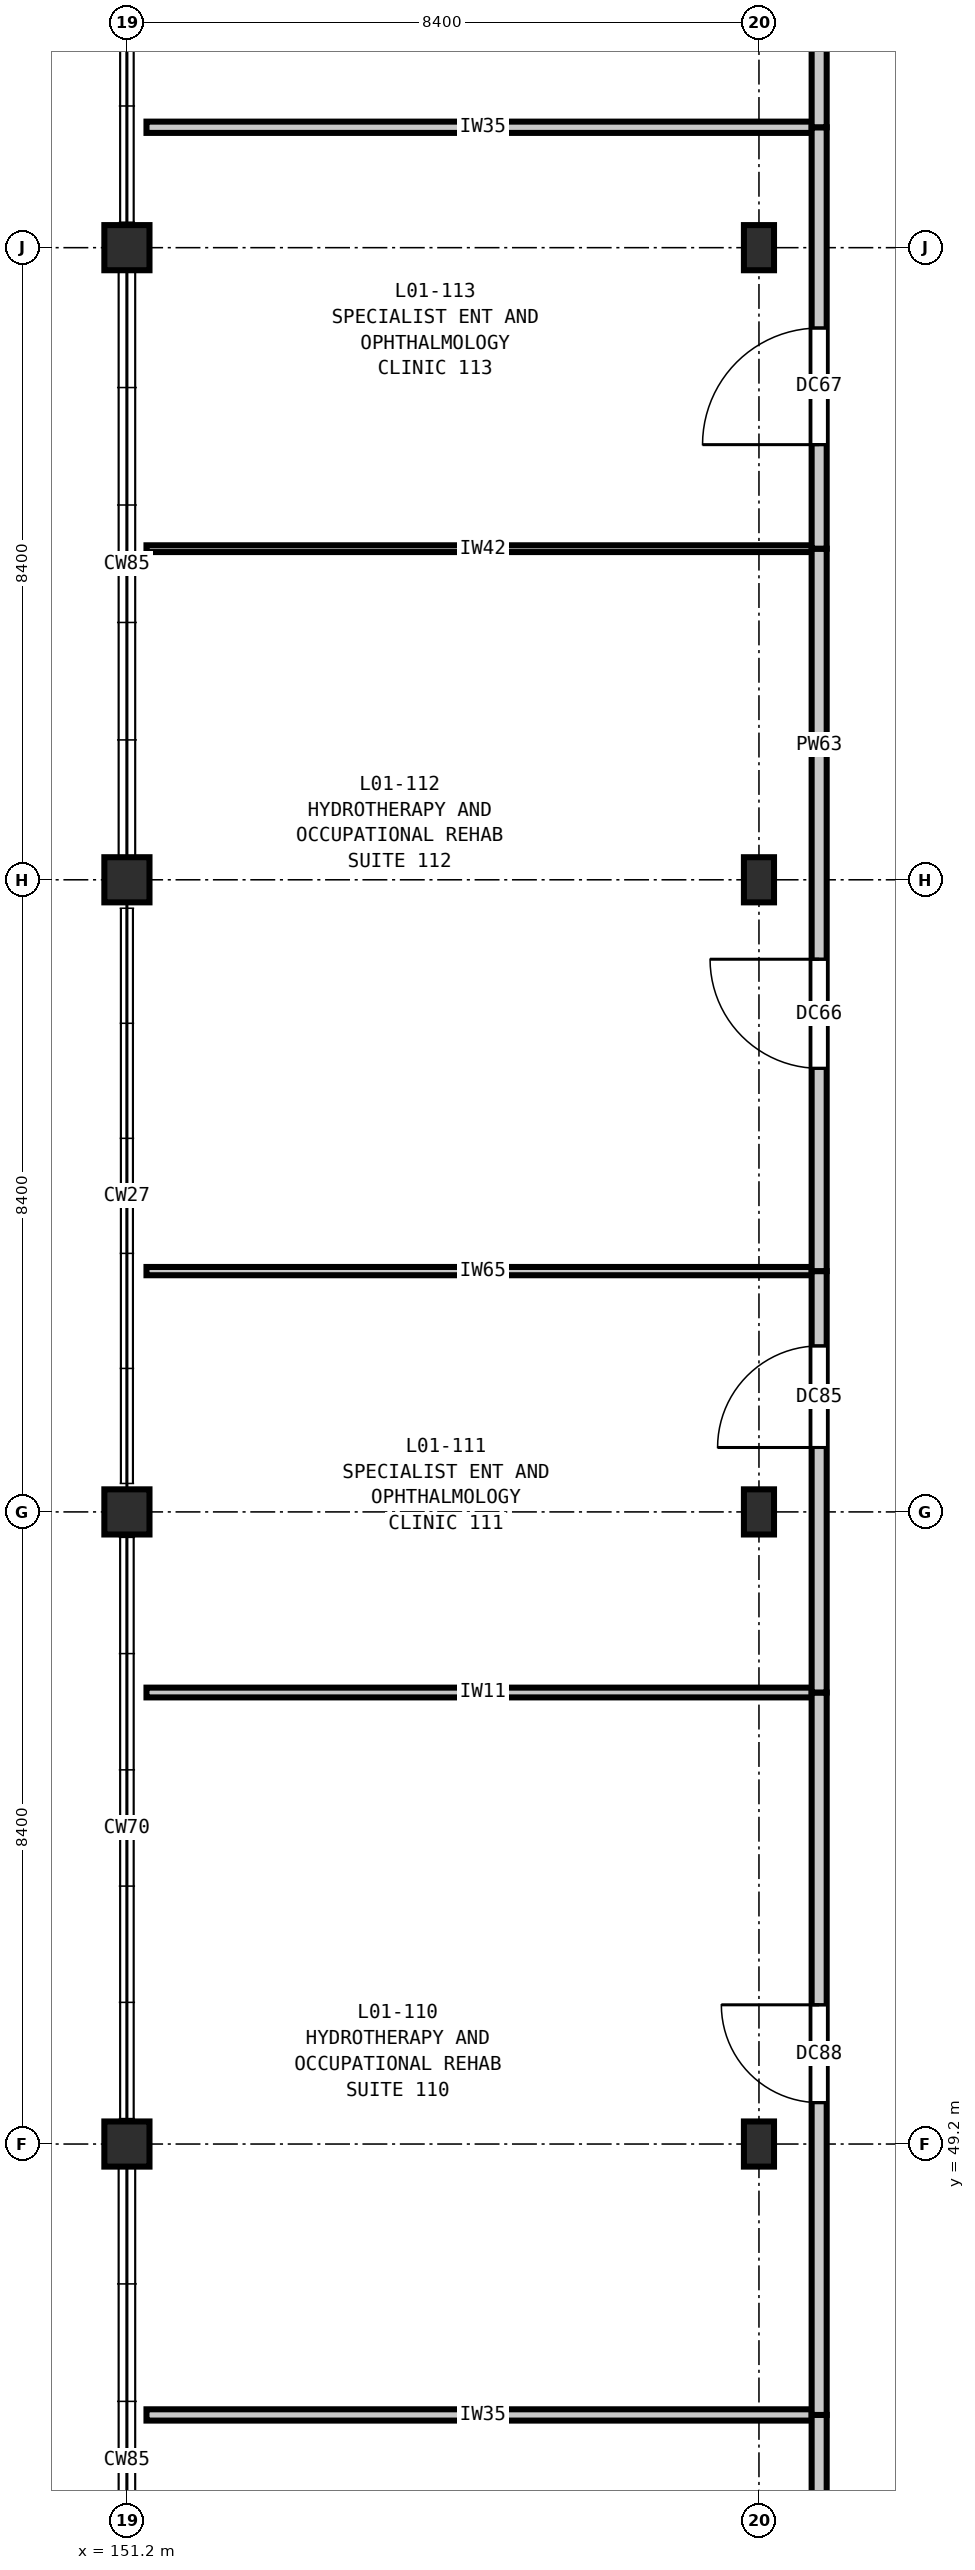
"""IFC4 building model, lengths in metres.
Left out: names, types, materials, properties, quantities, classifications, styles, units other than length and angle.
Written with IfcOpenShell. Run it as: python <this file> out.ifc"""

import sys

from ifc_helpers import new_model, si_unit, direction, frame, frame_2d, origin, origin_2d, place, context, subcontext, project, spatial, rectangle, extrude, element, fill, save


model = new_model("IFC4")
c1 = context("Model", 3, precision=1e-05, world=origin(), true_north=direction((0.0, 1.0)))
c2 = subcontext(c1, "Body", "Model", "MODEL_VIEW")
j1 = project(units=[si_unit("LENGTHUNIT", "METRE"), si_unit("PLANEANGLEUNIT", "RADIAN")], contexts=[c1])
p1 = place(None, origin())
s1 = spatial("IfcSite", under=j1, at=p1, CompositionType="ELEMENT")
p2 = place(p1, origin())
s2 = spatial("IfcBuilding", under=s1, at=p2, CompositionType="ELEMENT")
p3 = place(p2, frame((0.0, 0.0, 5.4)))
s3 = spatial("IfcBuildingStorey", under=s2, at=p3, CompositionType="ELEMENT", Elevation=5.4)
for number, where, z_axis, x_axis in (
    (1, (151.2, 49.2, 0.0), (0.0, 0.0, 1.0), (1.0, 0.0, 0.0)),
    (2, (151.2, 57.6, 0.0), (0.0, 0.0, 1.0), (1.0, 0.0, 0.0)),
    (3, (151.2, 66.0, 0.0), (0.0, 0.0, 1.0), (1.0, 0.0, 0.0)),
    (4, (151.2, 74.4, 0.0), (0.0, 0.0, 1.0), (1.0, 0.0, 0.0)),
):
    element("IfcColumn", number, at=place(p3, frame(where, z_axis=z_axis, x_axis=x_axis)), inside=s3, PredefinedType="COLUMN", context=c2, shape_type="SweptSolid", body=[
        extrude(rectangle(XDim=0.6, YDim=0.6, at=origin_2d()), origin(), (0.0, 0.0, 1.0), 5.4),
    ])
for number, where, z_axis, x_axis in (
    (5, (159.6, 49.2, 0.0), (0.0, 0.0, 1.0), (1.0, 0.0, 0.0)),
    (6, (159.6, 57.6, 0.0), (0.0, 0.0, 1.0), (1.0, 0.0, 0.0)),
    (7, (159.6, 66.0, 0.0), (0.0, 0.0, 1.0), (1.0, 0.0, 0.0)),
    (8, (159.6, 74.4, 0.0), (0.0, 0.0, 1.0), (1.0, 0.0, 0.0)),
):
    element("IfcColumn", number, at=place(p3, frame(where, z_axis=z_axis, x_axis=x_axis)), inside=s3, PredefinedType="COLUMN", context=c2, shape_type="SweptSolid", body=[
        extrude(rectangle(XDim=0.4, YDim=0.6, at=origin_2d()), origin(), (0.0, 0.0, 1.0), 5.4),
    ])
p4 = place(p3, frame((151.46, 45.6, 0.0), z_axis=(0.0, 0.0, 1.0), x_axis=(1.0, 0.0, 0.0)))
e9 = element("IfcWall", 9, at=p4, inside=s3, PredefinedType="PARTITIONING", context=c2, shape_type="SweptSolid", body=[
    extrude(rectangle(XDim=8.94, YDim=0.15, at=frame_2d((4.47, 0.0))), origin(), (0.0, 0.0, 1.0), 5.05),
])
p5 = place(p3, frame((151.46, 55.2, 0.0), z_axis=(0.0, 0.0, 1.0), x_axis=(1.0, 0.0, 0.0)))
e10 = element("IfcWall", 10, at=p5, inside=s3, PredefinedType="PARTITIONING", context=c2, shape_type="SweptSolid", body=[
    extrude(rectangle(XDim=8.94, YDim=0.13, at=frame_2d((4.47, 0.0))), origin(), (0.0, 0.0, 1.0), 5.05),
])
p6 = place(p3, frame((151.46, 60.8, 0.0), z_axis=(0.0, 0.0, 1.0), x_axis=(1.0, 0.0, 0.0)))
e11 = element("IfcWall", 11, at=p6, inside=s3, PredefinedType="PARTITIONING", context=c2, shape_type="SweptSolid", body=[
    extrude(rectangle(XDim=8.94, YDim=0.11, at=frame_2d((4.47, 0.0))), origin(), (0.0, 0.0, 1.0), 5.05),
])
p7 = place(p3, frame((151.46, 70.4, 0.0), z_axis=(0.0, 0.0, 1.0), x_axis=(1.0, 0.0, 0.0)))
e12 = element("IfcWall", 12, at=p7, inside=s3, PredefinedType="PARTITIONING", context=c2, shape_type="SweptSolid", body=[
    extrude(rectangle(XDim=8.94, YDim=0.09, at=frame_2d((4.47, 0.0))), origin(), (0.0, 0.0, 1.0), 5.05),
])
p8 = place(p3, frame((151.46, 76.0, 0.0), z_axis=(0.0, 0.0, 1.0), x_axis=(1.0, 0.0, 0.0)))
e13 = element("IfcWall", 13, at=p8, inside=s3, PredefinedType="PARTITIONING", context=c2, shape_type="SweptSolid", body=[
    extrude(rectangle(XDim=8.94, YDim=0.15, at=frame_2d((4.47, 0.0))), origin(), (0.0, 0.0, 1.0), 5.05),
])
p9 = place(p3, frame((160.4, 40.0, 0.0), z_axis=(0.0, 0.0, 1.0), x_axis=(0.0, 1.0, 0.0)))
e14 = element("IfcWall", 14, at=p9, inside=s3, PredefinedType="PARTITIONING", context=c2, shape_type="SweptSolid", body=[
    extrude(rectangle(XDim=5.6, YDim=0.2, at=frame_2d((2.8, 0.0))), origin(), (0.0, 0.0, 1.0), 5.05),
])
p10 = place(p9, frame((2.175, 0.0, 0.0)))
e15 = element("IfcOpeningElement", 15, at=p10, cuts=e14, PredefinedType="OPENING", context=c2, shape_type="SweptSolid", body=[
    extrude(rectangle(XDim=1.25, YDim=2.15, at=frame_2d((0.625, 1.075))), frame((0.0, 0.11, 0.0), z_axis=(0.0, -1.0, 0.0), x_axis=(1.0, 0.0, 0.0)), (0.0, 0.0, 1.0), 0.22),
])
p11 = place(p3, frame((160.4, 45.6, 0.0), z_axis=(0.0, 0.0, 1.0), x_axis=(0.0, 1.0, 0.0)))
e16 = element("IfcWall", 16, at=p11, inside=s3, PredefinedType="PARTITIONING", context=c2, shape_type="SweptSolid", body=[
    extrude(rectangle(XDim=9.6, YDim=0.2, at=frame_2d((4.8, 0.0))), origin(), (0.0, 0.0, 1.0), 5.05),
])
p12 = place(p11, frame((4.15, 0.0, 0.0)))
e17 = element("IfcOpeningElement", 17, at=p12, cuts=e16, PredefinedType="OPENING", context=c2, shape_type="SweptSolid", body=[
    extrude(rectangle(XDim=1.3, YDim=2.2, at=frame_2d((0.65, 1.1))), frame((0.0, 0.11, 0.0), z_axis=(0.0, -1.0, 0.0), x_axis=(1.0, 0.0, 0.0)), (0.0, 0.0, 1.0), 0.22),
])
p13 = place(p3, frame((160.4, 55.2, 0.0), z_axis=(0.0, 0.0, 1.0), x_axis=(0.0, 1.0, 0.0)))
e18 = element("IfcWall", 18, at=p13, inside=s3, PredefinedType="PARTITIONING", context=c2, shape_type="SweptSolid", body=[
    extrude(rectangle(XDim=5.6, YDim=0.2, at=frame_2d((2.8, 0.0))), origin(), (0.0, 0.0, 1.0), 5.05),
])
p14 = place(p13, frame((3.256, 0.0, 0.0)))
e19 = element("IfcOpeningElement", 19, at=p14, cuts=e18, PredefinedType="OPENING", context=c2, shape_type="SweptSolid", body=[
    extrude(rectangle(XDim=1.35, YDim=2.2, at=frame_2d((0.675, 1.1))), frame((0.0, 0.11, 0.0), z_axis=(0.0, -1.0, 0.0), x_axis=(1.0, 0.0, 0.0)), (0.0, 0.0, 1.0), 0.22),
])
p15 = place(p3, frame((160.4, 60.8, 0.0), z_axis=(0.0, 0.0, 1.0), x_axis=(0.0, 1.0, 0.0)))
e20 = element("IfcWall", 20, at=p15, inside=s3, PredefinedType="PARTITIONING", context=c2, shape_type="SweptSolid", body=[
    extrude(rectangle(XDim=9.6, YDim=0.2, at=frame_2d((4.8, 0.0))), origin(), (0.0, 0.0, 1.0), 5.05),
])
p16 = place(p15, frame((2.694, 0.0, 0.0)))
e21 = element("IfcOpeningElement", 21, at=p16, cuts=e20, PredefinedType="OPENING", context=c2, shape_type="SweptSolid", body=[
    extrude(rectangle(XDim=1.45, YDim=2.25, at=frame_2d((0.725, 1.125))), frame((0.0, 0.11, 0.0), z_axis=(0.0, -1.0, 0.0), x_axis=(1.0, 0.0, 0.0)), (0.0, 0.0, 1.0), 0.22),
])
p17 = place(p3, frame((160.4, 70.4, 0.0), z_axis=(0.0, 0.0, 1.0), x_axis=(0.0, 1.0, 0.0)))
e22 = element("IfcWall", 22, at=p17, inside=s3, PredefinedType="PARTITIONING", context=c2, shape_type="SweptSolid", body=[
    extrude(rectangle(XDim=5.6, YDim=0.2, at=frame_2d((2.8, 0.0))), origin(), (0.0, 0.0, 1.0), 5.05),
])
p18 = place(p17, frame((1.382, 0.0, 0.0)))
e23 = element("IfcOpeningElement", 23, at=p18, cuts=e22, PredefinedType="OPENING", context=c2, shape_type="SweptSolid", body=[
    extrude(rectangle(XDim=1.55, YDim=2.25, at=frame_2d((0.775, 1.125))), frame((0.0, 0.11, 0.0), z_axis=(0.0, -1.0, 0.0), x_axis=(1.0, 0.0, 0.0)), (0.0, 0.0, 1.0), 0.22),
])
p19 = place(p3, frame((160.4, 76.0, 0.0), z_axis=(0.0, 0.0, 1.0), x_axis=(0.0, 1.0, 0.0)))
e24 = element("IfcWall", 24, at=p19, inside=s3, PredefinedType="PARTITIONING", context=c2, shape_type="SweptSolid", body=[
    extrude(rectangle(XDim=6.8, YDim=0.2, at=frame_2d((3.4, 0.0))), origin(), (0.0, 0.0, 1.0), 5.05),
])
p20 = place(p19, frame((2.55, 0.0, 0.0)))
e25 = element("IfcOpeningElement", 25, at=p20, cuts=e24, PredefinedType="OPENING", context=c2, shape_type="SweptSolid", body=[
    extrude(rectangle(XDim=1.7, YDim=2.3, at=frame_2d((0.85, 1.15))), frame((0.0, 0.11, 0.0), z_axis=(0.0, -1.0, 0.0), x_axis=(1.0, 0.0, 0.0)), (0.0, 0.0, 1.0), 0.22),
])
p21 = place(p12, origin())
e26 = element("IfcDoor", 26, at=p21, inside=s3, OperationType="SINGLE_SWING_RIGHT", PredefinedType="DOOR", context=c2, shape_type="SweptSolid", body=[
    extrude(rectangle(XDim=1.3, YDim=2.2, at=frame_2d((0.65, 1.1))), frame((0.0, 0.025, 0.0), z_axis=(0.0, -1.0, 0.0), x_axis=(1.0, 0.0, 0.0)), (0.0, 0.0, 1.0), 0.05),
])
fill(e17, e26)
p22 = place(p14, origin())
e27 = element("IfcDoor", 27, at=p22, inside=s3, OperationType="SINGLE_SWING_LEFT", PredefinedType="DOOR", context=c2, shape_type="SweptSolid", body=[
    extrude(rectangle(XDim=1.35, YDim=2.2, at=frame_2d((0.675, 1.1))), frame((0.0, 0.025, 0.0), z_axis=(0.0, -1.0, 0.0), x_axis=(1.0, 0.0, 0.0)), (0.0, 0.0, 1.0), 0.05),
])
fill(e19, e27)
p23 = place(p16, origin())
e28 = element("IfcDoor", 28, at=p23, inside=s3, OperationType="SINGLE_SWING_RIGHT", PredefinedType="DOOR", context=c2, shape_type="SweptSolid", body=[
    extrude(rectangle(XDim=1.45, YDim=2.25, at=frame_2d((0.725, 1.125))), frame((0.0, 0.025, 0.0), z_axis=(0.0, -1.0, 0.0), x_axis=(1.0, 0.0, 0.0)), (0.0, 0.0, 1.0), 0.05),
])
fill(e21, e28)
p24 = place(p18, origin())
e29 = element("IfcDoor", 29, at=p24, inside=s3, OperationType="SINGLE_SWING_LEFT", PredefinedType="DOOR", context=c2, shape_type="SweptSolid", body=[
    extrude(rectangle(XDim=1.55, YDim=2.25, at=frame_2d((0.775, 1.125))), frame((0.0, 0.025, 0.0), z_axis=(0.0, -1.0, 0.0), x_axis=(1.0, 0.0, 0.0)), (0.0, 0.0, 1.0), 0.05),
])
fill(e23, e29)
save(model, sys.argv[1])
